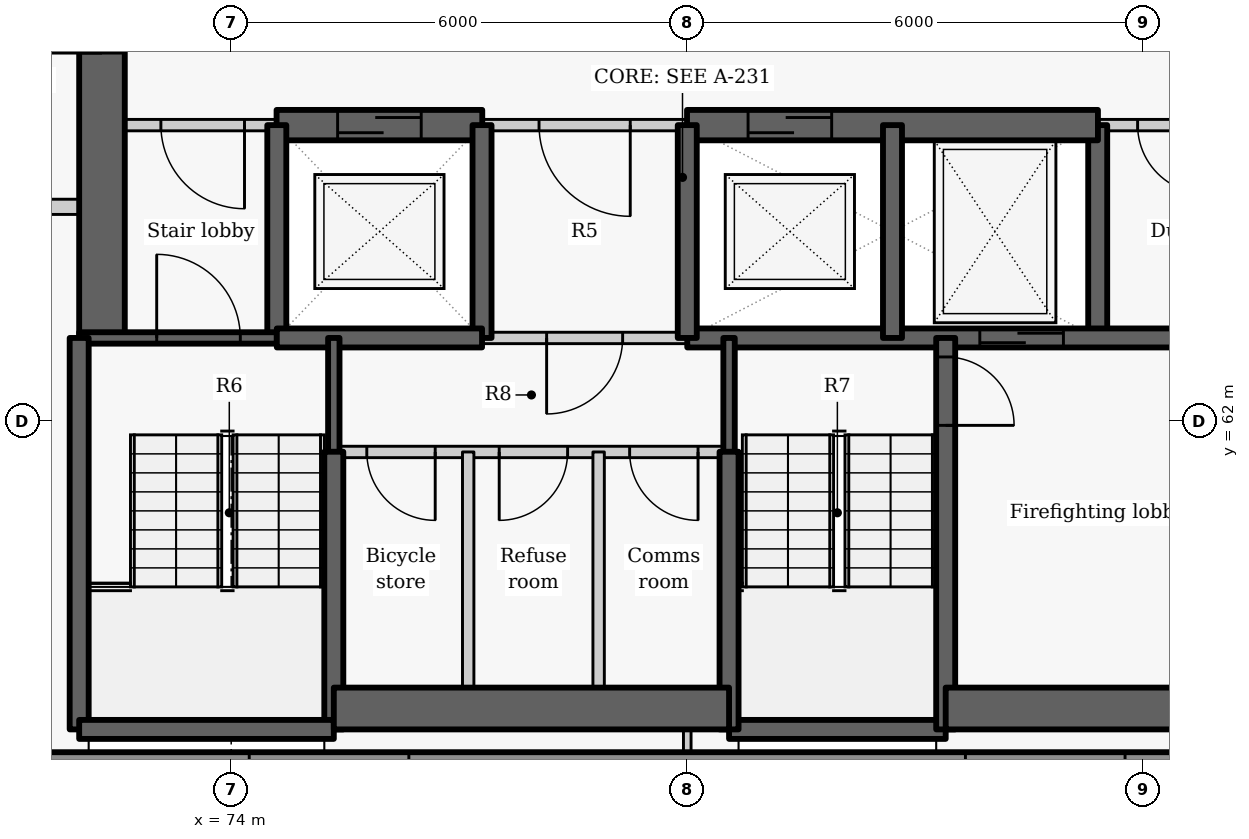
"""IFC4 building model, lengths in metres.
Left out: names, types, materials, properties, quantities, classifications, styles, units other than length and angle.
Written with IfcOpenShell. Run it as: python <this file> out.ifc"""

import sys

from ifc_helpers import new_model, si_unit, direction, frame, frame_2d, origin, place, context, subcontext, project, spatial, rectangle, extrude, element, fill, save


model = new_model("IFC4")
c1 = context("Model", 3, precision=1e-05, world=origin(), true_north=direction((0.0, 1.0)))
c2 = subcontext(c1, "Body", "Model", "MODEL_VIEW")
j1 = project(units=[si_unit("LENGTHUNIT", "METRE"), si_unit("PLANEANGLEUNIT", "RADIAN")], contexts=[c1])
p1 = place(None, origin())
s1 = spatial("IfcSite", under=j1, at=p1, CompositionType="ELEMENT")
p2 = place(p1, origin())
s2 = spatial("IfcBuilding", under=s1, at=p2, CompositionType="ELEMENT")
p3 = place(p2, frame((0.0, 0.0, 176.7)))
s3 = spatial("IfcBuildingStorey", under=s2, at=p3, CompositionType="ELEMENT", Elevation=176.7)
p4 = place(p3, frame((70.551, 57.5, 0.0), z_axis=(0.0, 0.0, 1.0), x_axis=(1.0, 0.0, 0.0)))
e1 = element("IfcWall", 1, at=p4, inside=s3, PredefinedType="SOLIDWALL", context=c2, shape_type="SweptSolid", body=[
    extrude(rectangle(XDim=18.893, YDim=0.3, at=frame_2d((9.446, 0.0))), origin(), (0.0, 0.0, 1.0), 2.425),
])
p5 = place(p4, frame((3.687, 0.0, 0.9)))
e2 = element("IfcOpeningElement", 2, at=p5, cuts=e1, PredefinedType="OPENING", context=c2, shape_type="SweptSolid", body=[
    extrude(rectangle(XDim=2.1, YDim=1.1, at=frame_2d((1.05, 0.55))), frame((0.0, 0.16, 0.0), z_axis=(0.0, -1.0, 0.0), x_axis=(1.0, 0.0, 0.0)), (0.0, 0.0, 1.0), 0.32),
])
p6 = place(p4, frame((13.109, 0.0, 0.9)))
e3 = element("IfcOpeningElement", 3, at=p6, cuts=e1, PredefinedType="OPENING", context=c2, shape_type="SweptSolid", body=[
    extrude(rectangle(XDim=2.1, YDim=1.1, at=frame_2d((1.05, 0.55))), frame((0.0, 0.16, 0.0), z_axis=(0.0, -1.0, 0.0), x_axis=(1.0, 0.0, 0.0)), (0.0, 0.0, 1.0), 0.32),
])
p7 = place(p3, frame((72.3, 63.1, -0.41), z_axis=(0.0, 0.0, 1.0), x_axis=(0.0, 1.0, 0.0)))
e4 = element("IfcWall", 4, at=p7, inside=s3, PredefinedType="SHEAR", context=c2, shape_type="SweptSolid", body=[
    extrude(rectangle(XDim=9.1, YDim=0.6, at=frame_2d((4.55, 0.0))), origin(), (0.0, 0.0, 1.0), 3.435),
])
p8 = place(p7, frame((3.748, 0.0, 0.41)))
e5 = element("IfcOpeningElement", 5, at=p8, cuts=e4, PredefinedType="OPENING", context=c2, shape_type="SweptSolid", body=[
    extrude(rectangle(XDim=1.5, YDim=2.1, at=frame_2d((0.75, 1.05))), frame((0.0, 0.31, 0.0), z_axis=(0.0, -1.0, 0.0), x_axis=(1.0, 0.0, 0.0)), (0.0, 0.0, 1.0), 0.62),
])
p9 = place(p3, frame((85.4, 63.1, -0.41), z_axis=(0.0, 0.0, 1.0), x_axis=(0.0, 1.0, 0.0)))
e6 = element("IfcWall", 6, at=p9, inside=s3, PredefinedType="SHEAR", context=c2, shape_type="SweptSolid", body=[
    extrude(rectangle(XDim=2.8, YDim=0.25, at=frame_2d((1.4, 0.0))), origin(), (0.0, 0.0, 1.0), 3.435),
])
p10 = place(p3, frame((74.603, 65.9, 0.0), z_axis=(0.0, 0.0, 1.0), x_axis=(-1.0, 0.0, 0.0)))
e7 = element("IfcWall", 7, at=p10, inside=s3, PredefinedType="PARTITIONING", context=c2, shape_type="SweptSolid", body=[
    extrude(rectangle(XDim=2.603, YDim=0.15, at=frame_2d((1.302, 0.0))), origin(), (0.0, 0.0, 1.0), 3.025),
])
p11 = place(p10, frame((0.428, 0.0, 0.0)))
e8 = element("IfcOpeningElement", 8, at=p11, cuts=e7, PredefinedType="OPENING", context=c2, shape_type="SweptSolid", body=[
    extrude(rectangle(XDim=1.1, YDim=2.1, at=frame_2d((0.55, 1.05))), frame((0.0, 0.085, 0.0), z_axis=(0.0, -1.0, 0.0), x_axis=(1.0, 0.0, 0.0)), (0.0, 0.0, 1.0), 0.17),
])
p12 = place(p3, frame((80.003, 65.9, 0.0), z_axis=(0.0, 0.0, 1.0), x_axis=(-1.0, 0.0, 0.0)))
e9 = element("IfcWall", 9, at=p12, inside=s3, PredefinedType="PARTITIONING", context=c2, shape_type="SweptSolid", body=[
    extrude(rectangle(XDim=2.706, YDim=0.15, at=frame_2d((1.353, 0.0))), origin(), (0.0, 0.0, 1.0), 3.025),
])
p13 = place(p12, frame((0.753, 0.0, 0.0)))
e10 = element("IfcOpeningElement", 10, at=p13, cuts=e9, PredefinedType="OPENING", context=c2, shape_type="SweptSolid", body=[
    extrude(rectangle(XDim=1.2, YDim=2.1, at=frame_2d((0.6, 1.05))), frame((0.0, 0.085, 0.0), z_axis=(0.0, -1.0, 0.0), x_axis=(1.0, 0.0, 0.0)), (0.0, 0.0, 1.0), 0.17),
])
p14 = place(p3, frame((88.0, 65.9, 0.0), z_axis=(0.0, 0.0, 1.0), x_axis=(-1.0, 0.0, 0.0)))
e11 = element("IfcWall", 11, at=p14, inside=s3, PredefinedType="PARTITIONING", context=c2, shape_type="SweptSolid", body=[
    extrude(rectangle(XDim=2.603, YDim=0.15, at=frame_2d((1.302, 0.0))), origin(), (0.0, 0.0, 1.0), 3.025),
])
p15 = place(p14, frame((1.175, 0.0, 0.0)))
e12 = element("IfcOpeningElement", 12, at=p15, cuts=e11, PredefinedType="OPENING", context=c2, shape_type="SweptSolid", body=[
    extrude(rectangle(XDim=0.9, YDim=2.1, at=frame_2d((0.45, 1.05))), frame((0.0, 0.085, 0.0), z_axis=(0.0, -1.0, 0.0), x_axis=(1.0, 0.0, 0.0)), (0.0, 0.0, 1.0), 0.17),
])
p16 = place(p3, frame((74.597, 65.9, -0.41), z_axis=(0.0, 0.0, 1.0), x_axis=(1.0, 0.0, 0.0)))
e13 = element("IfcWall", 13, at=p16, inside=s3, PredefinedType="SHEAR", context=c2, shape_type="SweptSolid", body=[
    extrude(rectangle(XDim=2.706, YDim=0.4, at=frame_2d((1.353, 0.0))), origin(), (0.0, 0.0, 1.0), 3.435),
])
p17 = place(p16, frame((0.803, 0.0, 0.41)))
e14 = element("IfcOpeningElement", 14, at=p17, cuts=e13, PredefinedType="OPENING", context=c2, shape_type="SweptSolid", body=[
    extrude(rectangle(XDim=1.1, YDim=2.1, at=frame_2d((0.55, 1.05))), frame((0.0, 0.21, 0.0), z_axis=(0.0, -1.0, 0.0), x_axis=(1.0, 0.0, 0.0)), (0.0, 0.0, 1.0), 0.42),
])
p18 = place(p3, frame((79.997, 65.9, -0.41), z_axis=(0.0, 0.0, 1.0), x_axis=(1.0, 0.0, 0.0)))
e15 = element("IfcWall", 15, at=p18, inside=s3, PredefinedType="SHEAR", context=c2, shape_type="SweptSolid", body=[
    extrude(rectangle(XDim=5.406, YDim=0.4, at=frame_2d((2.703, 0.0))), origin(), (0.0, 0.0, 1.0), 3.435),
])
p19 = place(p18, frame((0.803, 0.0, 0.41)))
e16 = element("IfcOpeningElement", 16, at=p19, cuts=e15, PredefinedType="OPENING", context=c2, shape_type="SweptSolid", body=[
    extrude(rectangle(XDim=1.1, YDim=2.1, at=frame_2d((0.55, 1.05))), frame((0.0, 0.21, 0.0), z_axis=(0.0, -1.0, 0.0), x_axis=(1.0, 0.0, 0.0)), (0.0, 0.0, 1.0), 0.42),
])
p20 = place(p3, frame((74.6, 63.1, -0.41), z_axis=(0.0, 0.0, 1.0), x_axis=(0.0, 1.0, 0.0)))
e17 = element("IfcWall", 17, at=p20, inside=s3, PredefinedType="SHEAR", context=c2, shape_type="SweptSolid", body=[
    extrude(rectangle(XDim=2.8, YDim=0.25, at=frame_2d((1.4, 0.0))), origin(), (0.0, 0.0, 1.0), 3.435),
])
p21 = place(p3, frame((72.0, 63.1, -0.41), z_axis=(0.0, 0.0, 1.0), x_axis=(1.0, 0.0, 0.0)))
e18 = element("IfcWall", 18, at=p21, inside=s3, PredefinedType="SHEAR", context=c2, shape_type="SweptSolid", body=[
    extrude(rectangle(XDim=2.6, YDim=0.15, at=frame_2d((1.3, 0.0))), origin(), (0.0, 0.0, 1.0), 3.435),
])
p22 = place(p21, frame((1.02, 0.0, 0.41)))
e19 = element("IfcOpeningElement", 19, at=p22, cuts=e18, PredefinedType="OPENING", context=c2, shape_type="SweptSolid", body=[
    extrude(rectangle(XDim=1.1, YDim=2.1, at=frame_2d((0.55, 1.05))), frame((0.0, 0.085, 0.0), z_axis=(0.0, -1.0, 0.0), x_axis=(1.0, 0.0, 0.0)), (0.0, 0.0, 1.0), 0.17),
])
p23 = place(p3, frame((77.3, 63.1, -0.41), z_axis=(0.0, 0.0, 1.0), x_axis=(0.0, 1.0, 0.0)))
e20 = element("IfcWall", 20, at=p23, inside=s3, PredefinedType="SHEAR", context=c2, shape_type="SweptSolid", body=[
    extrude(rectangle(XDim=2.8, YDim=0.25, at=frame_2d((1.4, 0.0))), origin(), (0.0, 0.0, 1.0), 3.435),
])
p24 = place(p3, frame((74.6, 63.1, -0.41), z_axis=(0.0, 0.0, 1.0), x_axis=(1.0, 0.0, 0.0)))
e21 = element("IfcWall", 21, at=p24, inside=s3, PredefinedType="SHEAR", context=c2, shape_type="SweptSolid", body=[
    extrude(rectangle(XDim=2.7, YDim=0.25, at=frame_2d((1.35, 0.0))), origin(), (0.0, 0.0, 1.0), 3.435),
])
p25 = place(p3, frame((80.0, 63.1, -0.41), z_axis=(0.0, 0.0, 1.0), x_axis=(1.0, 0.0, 0.0)))
e22 = element("IfcWall", 22, at=p25, inside=s3, PredefinedType="SHEAR", context=c2, shape_type="SweptSolid", body=[
    extrude(rectangle(XDim=8.0, YDim=0.25, at=frame_2d((4.0, 0.0))), origin(), (0.0, 0.0, 1.0), 3.435),
])
p26 = place(p25, frame((3.849, 0.0, 0.41)))
e23 = element("IfcOpeningElement", 23, at=p26, cuts=e22, PredefinedType="OPENING", context=c2, shape_type="SweptSolid", body=[
    extrude(rectangle(XDim=1.1, YDim=2.1, at=frame_2d((0.55, 1.05))), frame((0.0, 0.135, 0.0), z_axis=(0.0, -1.0, 0.0), x_axis=(1.0, 0.0, 0.0)), (0.0, 0.0, 1.0), 0.27),
])
p27 = place(p3, frame((80.0, 63.1, -0.41), z_axis=(0.0, 0.0, 1.0), x_axis=(0.0, 1.0, 0.0)))
e24 = element("IfcWall", 24, at=p27, inside=s3, PredefinedType="SHEAR", context=c2, shape_type="SweptSolid", body=[
    extrude(rectangle(XDim=2.8, YDim=0.25, at=frame_2d((1.4, 0.0))), origin(), (0.0, 0.0, 1.0), 3.435),
])
p28 = place(p3, frame((80.0, 63.1, 0.0), z_axis=(0.0, 0.0, 1.0), x_axis=(-1.0, 0.0, 0.0)))
e25 = element("IfcWall", 25, at=p28, inside=s3, PredefinedType="PARTITIONING", context=c2, shape_type="SweptSolid", body=[
    extrude(rectangle(XDim=2.7, YDim=0.15, at=frame_2d((1.35, 0.0))), origin(), (0.0, 0.0, 1.0), 3.025),
])
p29 = place(p28, frame((0.85, 0.0, 0.0)))
e26 = element("IfcOpeningElement", 26, at=p29, cuts=e25, PredefinedType="OPENING", context=c2, shape_type="SweptSolid", body=[
    extrude(rectangle(XDim=1.0, YDim=2.1, at=frame_2d((0.5, 1.05))), frame((0.0, 0.085, 0.0), z_axis=(0.0, -1.0, 0.0), x_axis=(1.0, 0.0, 0.0)), (0.0, 0.0, 1.0), 0.17),
])
p30 = place(p3, frame((82.7, 63.1, -0.41), z_axis=(0.0, 0.0, 1.0), x_axis=(0.0, 1.0, 0.0)))
e27 = element("IfcWall", 27, at=p30, inside=s3, PredefinedType="SHEAR", context=c2, shape_type="SweptSolid", body=[
    extrude(rectangle(XDim=2.8, YDim=0.25, at=frame_2d((1.4, 0.0))), origin(), (0.0, 0.0, 1.0), 3.435),
])
p31 = place(p3, frame((75.35, 61.597, -0.41), z_axis=(0.0, 0.0, 1.0), x_axis=(0.0, 1.0, 0.0)))
e28 = element("IfcWall", 28, at=p31, inside=s3, PredefinedType="SHEAR", context=c2, shape_type="SweptSolid", body=[
    extrude(rectangle(XDim=1.503, YDim=0.15, at=frame_2d((0.751, 0.0))), origin(), (0.0, 0.0, 1.0), 3.435),
])
p32 = place(p3, frame((75.35, 57.95, -0.41), z_axis=(0.0, 0.0, 1.0), x_axis=(0.0, 1.0, 0.0)))
e29 = element("IfcWall", 29, at=p32, inside=s3, PredefinedType="SHEAR", context=c2, shape_type="SweptSolid", body=[
    extrude(rectangle(XDim=3.653, YDim=0.25, at=frame_2d((1.827, 0.0))), origin(), (0.0, 0.0, 1.0), 3.435),
])
p33 = place(p3, frame((72.0, 57.95, -0.41), z_axis=(0.0, 0.0, 1.0), x_axis=(0.0, 1.0, 0.0)))
e30 = element("IfcWall", 30, at=p33, inside=s3, PredefinedType="SHEAR", context=c2, shape_type="SweptSolid", body=[
    extrude(rectangle(XDim=5.15, YDim=0.25, at=frame_2d((2.575, 0.0))), origin(), (0.0, 0.0, 1.0), 3.435),
])
p34 = place(p3, frame((72.0, 57.95, 0.0), z_axis=(0.0, 0.0, 1.0), x_axis=(1.0, 0.0, 0.0)))
e31 = element("IfcWall", 31, at=p34, inside=s3, PredefinedType="SHEAR", context=c2, shape_type="SweptSolid", body=[
    extrude(rectangle(XDim=3.35, YDim=0.25, at=frame_2d((1.675, 0.0))), origin(), (0.0, 0.0, 1.0), 3.025),
])
p35 = place(p3, frame((80.55, 57.95, 0.0), z_axis=(0.0, 0.0, 1.0), x_axis=(1.0, 0.0, 0.0)))
e32 = element("IfcWall", 32, at=p35, inside=s3, PredefinedType="SHEAR", context=c2, shape_type="SweptSolid", body=[
    extrude(rectangle(XDim=2.85, YDim=0.25, at=frame_2d((1.425, 0.0))), origin(), (0.0, 0.0, 1.0), 3.025),
])
p36 = place(p3, frame((83.4, 63.1, -0.41), z_axis=(0.0, 0.0, 1.0), x_axis=(0.0, -1.0, 0.0)))
e33 = element("IfcWall", 33, at=p36, inside=s3, PredefinedType="SHEAR", context=c2, shape_type="SweptSolid", body=[
    extrude(rectangle(XDim=5.15, YDim=0.25, at=frame_2d((2.575, 0.0))), origin(), (0.0, 0.0, 1.0), 3.435),
])
p37 = place(p36, frame((0.25, 0.0, 0.41)))
e34 = element("IfcOpeningElement", 34, at=p37, cuts=e33, PredefinedType="OPENING", context=c2, shape_type="SweptSolid", body=[
    extrude(rectangle(XDim=0.9, YDim=2.1, at=frame_2d((0.45, 1.05))), frame((0.0, 0.135, 0.0), z_axis=(0.0, -1.0, 0.0), x_axis=(1.0, 0.0, 0.0)), (0.0, 0.0, 1.0), 0.27),
])
p38 = place(p3, frame((80.55, 61.597, -0.41), z_axis=(0.0, 0.0, 1.0), x_axis=(0.0, 1.0, 0.0)))
e35 = element("IfcWall", 35, at=p38, inside=s3, PredefinedType="SHEAR", context=c2, shape_type="SweptSolid", body=[
    extrude(rectangle(XDim=1.503, YDim=0.15, at=frame_2d((0.751, 0.0))), origin(), (0.0, 0.0, 1.0), 3.435),
])
p39 = place(p3, frame((80.55, 57.95, -0.41), z_axis=(0.0, 0.0, 1.0), x_axis=(0.0, 1.0, 0.0)))
e36 = element("IfcWall", 36, at=p39, inside=s3, PredefinedType="SHEAR", context=c2, shape_type="SweptSolid", body=[
    extrude(rectangle(XDim=3.653, YDim=0.25, at=frame_2d((1.827, 0.0))), origin(), (0.0, 0.0, 1.0), 3.435),
])
p40 = place(p3, frame((75.35, 58.225, 0.0), z_axis=(0.0, 0.0, 1.0), x_axis=(1.0, 0.0, 0.0)))
e37 = element("IfcWall", 37, at=p40, inside=s3, PredefinedType="SHEAR", context=c2, shape_type="SweptSolid", body=[
    extrude(rectangle(XDim=5.2, YDim=0.55, at=frame_2d((2.6, 0.0))), origin(), (0.0, 0.0, 1.0), 3.025),
])
p41 = place(p3, frame((83.4, 58.225, 0.0), z_axis=(0.0, 0.0, 1.0), x_axis=(1.0, 0.0, 0.0)))
e38 = element("IfcWall", 38, at=p41, inside=s3, PredefinedType="SHEAR", context=c2, shape_type="SweptSolid", body=[
    extrude(rectangle(XDim=4.6, YDim=0.55, at=frame_2d((2.3, 0.0))), origin(), (0.0, 0.0, 1.0), 3.025),
])
p42 = place(p3, frame((80.55, 61.6, 0.0), z_axis=(0.0, 0.0, 1.0), x_axis=(-1.0, 0.0, 0.0)))
e39 = element("IfcWall", 39, at=p42, inside=s3, PredefinedType="PARTITIONING", context=c2, shape_type="SweptSolid", body=[
    extrude(rectangle(XDim=5.2, YDim=0.15, at=frame_2d((2.6, 0.0))), origin(), (0.0, 0.0, 1.0), 3.025),
])
p43 = place(p42, frame((3.866, 0.0, 0.0)))
e40 = element("IfcOpeningElement", 40, at=p43, cuts=e39, PredefinedType="OPENING", context=c2, shape_type="SweptSolid", body=[
    extrude(rectangle(XDim=0.9, YDim=2.1, at=frame_2d((0.45, 1.05))), frame((0.0, 0.085, 0.0), z_axis=(0.0, -1.0, 0.0), x_axis=(1.0, 0.0, 0.0)), (0.0, 0.0, 1.0), 0.17),
])
p44 = place(p42, frame((2.124, 0.0, 0.0)))
e41 = element("IfcOpeningElement", 41, at=p44, cuts=e39, PredefinedType="OPENING", context=c2, shape_type="SweptSolid", body=[
    extrude(rectangle(XDim=0.9, YDim=2.1, at=frame_2d((0.45, 1.05))), frame((0.0, 0.085, 0.0), z_axis=(0.0, -1.0, 0.0), x_axis=(1.0, 0.0, 0.0)), (0.0, 0.0, 1.0), 0.17),
])
p45 = place(p42, frame((0.408, 0.0, 0.0)))
e42 = element("IfcOpeningElement", 42, at=p45, cuts=e39, PredefinedType="OPENING", context=c2, shape_type="SweptSolid", body=[
    extrude(rectangle(XDim=0.9, YDim=2.1, at=frame_2d((0.45, 1.05))), frame((0.0, 0.085, 0.0), z_axis=(0.0, -1.0, 0.0), x_axis=(1.0, 0.0, 0.0)), (0.0, 0.0, 1.0), 0.17),
])
for number, where, z_axis, x_axis in (
    (43, (77.118, 57.95, 0.0), (0.0, 0.0, 1.0), (0.0, 1.0, 0.0)),
    (44, (78.834, 57.95, 0.0), (0.0, 0.0, 1.0), (0.0, 1.0, 0.0)),
):
    element("IfcWall", number, at=place(p3, frame(where, z_axis=z_axis, x_axis=x_axis)), inside=s3, PredefinedType="PARTITIONING", context=c2, shape_type="SweptSolid", body=[
        extrude(rectangle(XDim=3.65, YDim=0.15, at=frame_2d((1.825, 0.0))), origin(), (0.0, 0.0, 1.0), 3.025),
    ])
p46 = place(p3, frame((70.527, 64.825, 0.0), z_axis=(0.0, 0.0, 1.0), x_axis=(1.0, 0.0, 0.0)))
e45 = element("IfcWall", 45, at=p46, inside=s3, PredefinedType="PARTITIONING", context=c2, shape_type="SweptSolid", body=[
    extrude(rectangle(XDim=1.473, YDim=0.2, at=frame_2d((0.736, 0.0))), origin(), (0.0, 0.0, 1.0), 3.025),
])
p47 = place(p3, frame((80.0, 57.65, 0.0), z_axis=(0.0, 0.0, 1.0), x_axis=(0.0, 1.0, 0.0)))
e46 = element("IfcWall", 46, at=p47, inside=s3, PredefinedType="PARTITIONING", context=c2, shape_type="SweptSolid", body=[
    extrude(rectangle(XDim=0.3, YDim=0.1, at=frame_2d((0.15, 0.0))), origin(), (0.0, 0.0, 1.0), 3.025),
])
p48 = place(p11, origin())
e47 = element("IfcDoor", 47, at=p48, inside=s3, OperationType="SINGLE_SWING_LEFT", PredefinedType="DOOR", context=c2, shape_type="SweptSolid", body=[
    extrude(rectangle(XDim=1.1, YDim=2.1, at=frame_2d((0.55, 1.05))), frame((0.0, 0.025, 0.0), z_axis=(0.0, -1.0, 0.0), x_axis=(1.0, 0.0, 0.0)), (0.0, 0.0, 1.0), 0.05),
])
fill(e8, e47)
p49 = place(p17, origin())
e48 = element("IfcDoor", 48, at=p49, inside=s3, OperationType="SLIDING_TO_LEFT", PredefinedType="DOOR", context=c2, shape_type="SweptSolid", body=[
    extrude(rectangle(XDim=1.1, YDim=2.1, at=frame_2d((0.55, 1.05))), frame((0.0, 0.025, 0.0), z_axis=(0.0, -1.0, 0.0), x_axis=(1.0, 0.0, 0.0)), (0.0, 0.0, 1.0), 0.05),
])
fill(e14, e48)
p50 = place(p13, origin())
e49 = element("IfcDoor", 49, at=p50, inside=s3, OperationType="DOUBLE_DOOR_SINGLE_SWING", PredefinedType="DOOR", context=c2, shape_type="SweptSolid", body=[
    extrude(rectangle(XDim=1.2, YDim=2.1, at=frame_2d((0.6, 1.05))), frame((0.0, 0.025, 0.0), z_axis=(0.0, -1.0, 0.0), x_axis=(1.0, 0.0, 0.0)), (0.0, 0.0, 1.0), 0.05),
])
fill(e10, e49)
p51 = place(p19, origin())
e50 = element("IfcDoor", 50, at=p51, inside=s3, OperationType="SLIDING_TO_LEFT", PredefinedType="DOOR", context=c2, shape_type="SweptSolid", body=[
    extrude(rectangle(XDim=1.1, YDim=2.1, at=frame_2d((0.55, 1.05))), frame((0.0, 0.025, 0.0), z_axis=(0.0, -1.0, 0.0), x_axis=(1.0, 0.0, 0.0)), (0.0, 0.0, 1.0), 0.05),
])
fill(e16, e50)
p52 = place(p26, origin())
e51 = element("IfcDoor", 51, at=p52, inside=s3, OperationType="SLIDING_TO_LEFT", PredefinedType="DOOR", context=c2, shape_type="SweptSolid", body=[
    extrude(rectangle(XDim=1.1, YDim=2.1, at=frame_2d((0.55, 1.05))), frame((0.0, 0.025, 0.0), z_axis=(0.0, -1.0, 0.0), x_axis=(1.0, 0.0, 0.0)), (0.0, 0.0, 1.0), 0.05),
])
fill(e23, e51)
p53 = place(p15, origin())
e52 = element("IfcDoor", 52, at=p53, inside=s3, OperationType="SINGLE_SWING_LEFT", PredefinedType="DOOR", context=c2, shape_type="SweptSolid", body=[
    extrude(rectangle(XDim=0.9, YDim=2.1, at=frame_2d((0.45, 1.05))), frame((0.0, 0.025, 0.0), z_axis=(0.0, -1.0, 0.0), x_axis=(1.0, 0.0, 0.0)), (0.0, 0.0, 1.0), 0.05),
])
fill(e12, e52)
p54 = place(p29, origin())
e53 = element("IfcDoor", 53, at=p54, inside=s3, OperationType="SINGLE_SWING_RIGHT", PredefinedType="DOOR", context=c2, shape_type="SweptSolid", body=[
    extrude(rectangle(XDim=1.0, YDim=2.1, at=frame_2d((0.5, 1.05))), frame((0.0, 0.025, 0.0), z_axis=(0.0, -1.0, 0.0), x_axis=(1.0, 0.0, 0.0)), (0.0, 0.0, 1.0), 0.05),
])
fill(e26, e53)
p55 = place(p43, origin())
e54 = element("IfcDoor", 54, at=p55, inside=s3, OperationType="SINGLE_SWING_LEFT", PredefinedType="DOOR", context=c2, shape_type="SweptSolid", body=[
    extrude(rectangle(XDim=0.9, YDim=2.1, at=frame_2d((0.45, 1.05))), frame((0.0, 0.025, 0.0), z_axis=(0.0, -1.0, 0.0), x_axis=(1.0, 0.0, 0.0)), (0.0, 0.0, 1.0), 0.05),
])
fill(e40, e54)
p56 = place(p44, origin())
e55 = element("IfcDoor", 55, at=p56, inside=s3, OperationType="SINGLE_SWING_RIGHT", PredefinedType="DOOR", context=c2, shape_type="SweptSolid", body=[
    extrude(rectangle(XDim=0.9, YDim=2.1, at=frame_2d((0.45, 1.05))), frame((0.0, 0.025, 0.0), z_axis=(0.0, -1.0, 0.0), x_axis=(1.0, 0.0, 0.0)), (0.0, 0.0, 1.0), 0.05),
])
fill(e41, e55)
p57 = place(p45, origin())
e56 = element("IfcDoor", 56, at=p57, inside=s3, OperationType="SINGLE_SWING_LEFT", PredefinedType="DOOR", context=c2, shape_type="SweptSolid", body=[
    extrude(rectangle(XDim=0.9, YDim=2.1, at=frame_2d((0.45, 1.05))), frame((0.0, 0.025, 0.0), z_axis=(0.0, -1.0, 0.0), x_axis=(1.0, 0.0, 0.0)), (0.0, 0.0, 1.0), 0.05),
])
fill(e42, e56)
p58 = place(p22, origin())
e57 = element("IfcDoor", 57, at=p58, inside=s3, OperationType="SINGLE_SWING_LEFT", PredefinedType="DOOR", context=c2, shape_type="SweptSolid", body=[
    extrude(rectangle(XDim=1.1, YDim=2.1, at=frame_2d((0.55, 1.05))), frame((0.0, 0.025, 0.0), z_axis=(0.0, -1.0, 0.0), x_axis=(1.0, 0.0, 0.0)), (0.0, 0.0, 1.0), 0.05),
])
fill(e19, e57)
p59 = place(p37, origin())
e58 = element("IfcDoor", 58, at=p59, inside=s3, OperationType="SINGLE_SWING_RIGHT", PredefinedType="DOOR", context=c2, shape_type="SweptSolid", body=[
    extrude(rectangle(XDim=0.9, YDim=2.1, at=frame_2d((0.45, 1.05))), frame((0.0, 0.025, 0.0), z_axis=(0.0, -1.0, 0.0), x_axis=(1.0, 0.0, 0.0)), (0.0, 0.0, 1.0), 0.05),
])
fill(e34, e58)
p60 = place(p8, origin())
e59 = element("IfcDoor", 59, at=p60, inside=s3, OperationType="DOUBLE_DOOR_SINGLE_SWING", PredefinedType="DOOR", context=c2, shape_type="SweptSolid", body=[
    extrude(rectangle(XDim=1.5, YDim=2.1, at=frame_2d((0.75, 1.05))), frame((0.0, 0.025, 0.0), z_axis=(0.0, -1.0, 0.0), x_axis=(1.0, 0.0, 0.0)), (0.0, 0.0, 1.0), 0.05),
])
fill(e5, e59)
save(model, sys.argv[1])
